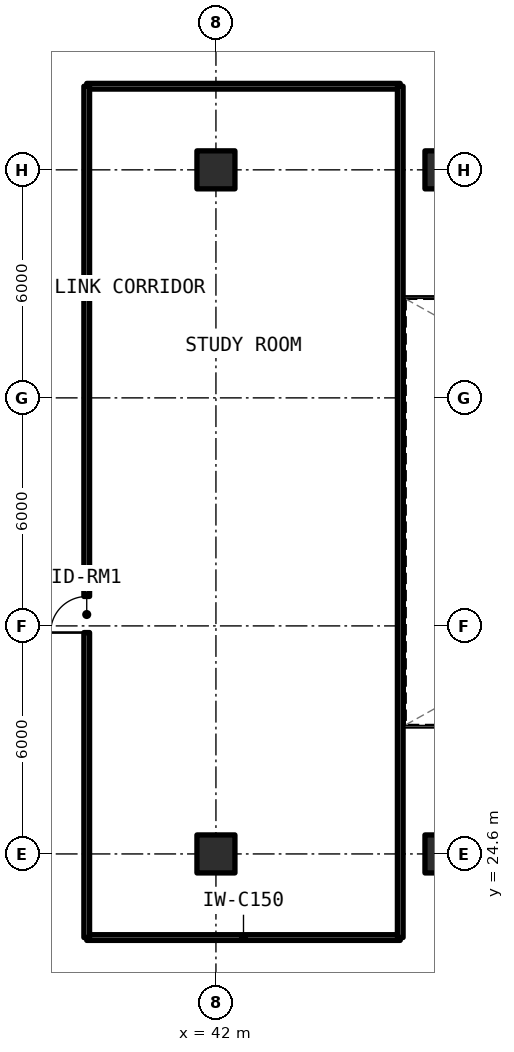
"""IFC4 building model, lengths in metres.
Left out: names, types, materials, properties, quantities, classifications, styles, units other than length and angle.
Written with IfcOpenShell. Run it as: python <this file> out.ifc"""

import sys

from ifc_helpers import new_model, si_unit, direction, frame, frame_2d, origin, origin_2d, place, context, subcontext, project, spatial, rectangle, extrude, element, fill, save


model = new_model("IFC4")
c1 = context("Model", 3, precision=1e-05, world=origin(), true_north=direction((0.0, 1.0)))
c2 = subcontext(c1, "Body", "Model", "MODEL_VIEW")
j1 = project(units=[si_unit("LENGTHUNIT", "METRE"), si_unit("PLANEANGLEUNIT", "RADIAN")], contexts=[c1])
p1 = place(None, origin())
s1 = spatial("IfcSite", under=j1, at=p1, CompositionType="ELEMENT")
p2 = place(p1, origin())
s2 = spatial("IfcBuilding", under=s1, at=p2, CompositionType="ELEMENT")
p3 = place(p2, frame((0.0, 0.0, 88.77)))
s3 = spatial("IfcBuildingStorey", under=s2, at=p3, CompositionType="ELEMENT", Elevation=88.77)
for number, where, z_axis, x_axis in (
    (1, (42.0, 24.6, 0.0), (0.0, 0.0, 1.0), (1.0, 0.0, 0.0)),
    (2, (42.0, 42.6, 0.0), (0.0, 0.0, 1.0), (1.0, 0.0, 0.0)),
    (3, (48.0, 24.6, 0.0), (0.0, 0.0, 1.0), (1.0, 0.0, 0.0)),
    (4, (48.0, 42.6, 0.0), (0.0, 0.0, 1.0), (1.0, 0.0, 0.0)),
):
    element("IfcColumn", number, at=place(p3, frame(where, z_axis=z_axis, x_axis=x_axis)), inside=s3, PredefinedType="COLUMN", context=c2, shape_type="SweptSolid", body=[
        extrude(rectangle(XDim=1.0, YDim=1.0, at=origin_2d()), origin(), (0.0, 0.0, 1.0), 3.3),
    ])
for number, where, z_axis, x_axis in (
    (5, (38.6, 22.4, 0.0), (0.0, 0.0, 1.0), (1.0, 0.0, 0.0)),
    (6, (38.6, 44.8, 0.0), (0.0, 0.0, 1.0), (1.0, 0.0, 0.0)),
):
    element("IfcWall", number, at=place(p3, frame(where, z_axis=z_axis, x_axis=x_axis)), inside=s3, PredefinedType="SOLIDWALL", context=c2, shape_type="SweptSolid", body=[
        extrude(rectangle(XDim=8.25, YDim=0.15, at=frame_2d((4.125, 0.0))), origin(), (0.0, 0.0, 1.0), 2.35),
    ])
p4 = place(p3, frame((38.6, 22.4, 0.0), z_axis=(0.0, 0.0, 1.0), x_axis=(0.0, 1.0, 0.0)))
e7 = element("IfcWall", 7, at=p4, inside=s3, PredefinedType="SOLIDWALL", context=c2, shape_type="SweptSolid", body=[
    extrude(rectangle(XDim=22.4, YDim=0.15, at=frame_2d((11.2, 0.0))), origin(), (0.0, 0.0, 1.0), 2.35),
])
p5 = place(p4, frame((8.025, 0.0, 0.0)))
e8 = element("IfcOpeningElement", 8, at=p5, cuts=e7, PredefinedType="OPENING", context=c2, shape_type="SweptSolid", body=[
    extrude(rectangle(XDim=0.95, YDim=2.15, at=frame_2d((0.475, 1.075))), frame((0.0, 0.085, 0.0), z_axis=(0.0, -1.0, 0.0), x_axis=(1.0, 0.0, 0.0)), (0.0, 0.0, 1.0), 0.17),
])
p6 = place(p3, frame((46.85, 22.4, 0.0), z_axis=(0.0, 0.0, 1.0), x_axis=(0.0, 1.0, 0.0)))
e9 = element("IfcWall", 9, at=p6, inside=s3, PredefinedType="SOLIDWALL", context=c2, shape_type="SweptSolid", body=[
    extrude(rectangle(XDim=22.4, YDim=0.15, at=frame_2d((11.2, 0.0))), origin(), (0.0, 0.0, 1.0), 2.35),
])
p7 = place(p5, origin())
e10 = element("IfcDoor", 10, at=p7, inside=s3, OperationType="SINGLE_SWING_LEFT", PredefinedType="DOOR", context=c2, shape_type="SweptSolid", body=[
    extrude(rectangle(XDim=0.95, YDim=2.15, at=frame_2d((0.475, 1.075))), frame((0.0, 0.025, 0.0), z_axis=(0.0, -1.0, 0.0), x_axis=(1.0, 0.0, 0.0)), (0.0, 0.0, 1.0), 0.05),
])
fill(e8, e10)
save(model, sys.argv[1])
